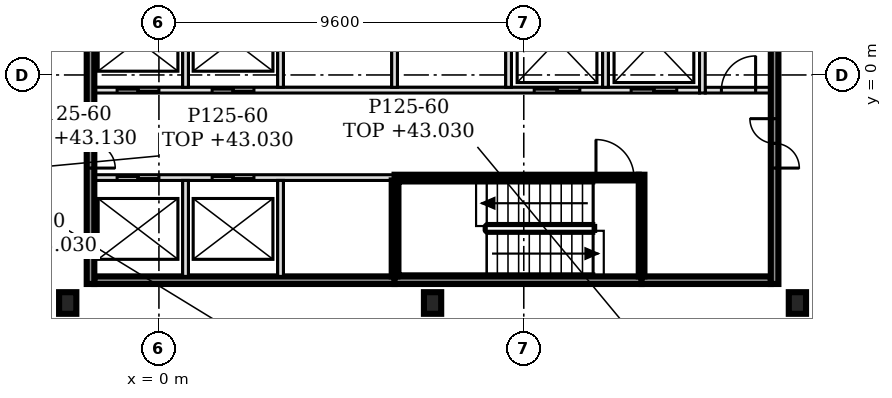
"""IFC4 building model, lengths in metres.
Left out: names, types, materials, properties, quantities, classifications, styles, units other than length and angle.
Written with IfcOpenShell. Run it as: python <this file> out.ifc"""

import sys

from ifc_helpers import new_model, si_unit, direction, frame, frame_2d, origin, origin_2d, place, context, subcontext, project, spatial, rectangle, i_section, extrude, element, fill, save


model = new_model("IFC4")
c1 = context("Model", 3, precision=1e-05, world=origin(), true_north=direction((0.0, 1.0)))
c2 = subcontext(c1, "Body", "Model", "MODEL_VIEW")
j1 = project(units=[si_unit("LENGTHUNIT", "METRE"), si_unit("PLANEANGLEUNIT", "RADIAN")], contexts=[c1])
p1 = place(None, origin())
s1 = spatial("IfcSite", under=j1, at=p1, CompositionType="ELEMENT")
p2 = place(p1, origin())
s2 = spatial("IfcBuilding", under=s1, at=p2, CompositionType="ELEMENT")
p3 = place(p2, frame((0.0, 0.0, 40.2)))
s3 = spatial("IfcBuildingStorey", under=s2, at=p3, CompositionType="ELEMENT", Elevation=40.2)
for number, where, z_axis, x_axis in (
    (1, (-2.4, -6.0, -0.15), (0.0, 0.0, 1.0), (1.0, 0.0, 0.0)),
    (2, (7.2, -6.0, -0.15), (0.0, 0.0, 1.0), (1.0, 0.0, 0.0)),
    (3, (16.8, -6.0, -0.15), (0.0, 0.0, 1.0), (1.0, 0.0, 0.0)),
):
    element("IfcColumn", number, at=place(p3, frame(where, z_axis=z_axis, x_axis=x_axis)), inside=s3, PredefinedType="COLUMN", context=c2, shape_type="SweptSolid", body=[
        extrude(i_section(OverallWidth=0.454, OverallDepth=0.569, WebThickness=0.078, FlangeThickness=0.125, FilletRadius=0.015, at=origin_2d()), origin(), (0.0, 0.0, 1.0), 3.6),
    ])
p4 = place(p3, frame((-1.7, -5.4, 0.0), z_axis=(0.0, 0.0, 1.0), x_axis=(1.0, 0.0, 0.0)))
e4 = element("IfcWall", 4, at=p4, inside=s3, PredefinedType="SOLIDWALL", context=c2, shape_type="SweptSolid", body=[
    extrude(rectangle(XDim=7.9, YDim=0.2, at=frame_2d((3.95, 0.0))), origin(), (0.0, 0.0, 1.0), 3.45),
])
p5 = place(p3, frame((6.2, -5.4, 0.0), z_axis=(0.0, 0.0, 1.0), x_axis=(1.0, 0.0, 0.0)))
e5 = element("IfcWall", 5, at=p5, inside=s3, PredefinedType="SOLIDWALL", context=c2, shape_type="SweptSolid", body=[
    extrude(rectangle(XDim=6.5, YDim=0.2, at=frame_2d((3.25, 0.0))), origin(), (0.0, 0.0, 1.0), 3.45),
])
p6 = place(p3, frame((12.7, -5.4, 0.0), z_axis=(0.0, 0.0, 1.0), x_axis=(1.0, 0.0, 0.0)))
e6 = element("IfcWall", 6, at=p6, inside=s3, PredefinedType="SOLIDWALL", context=c2, shape_type="SweptSolid", body=[
    extrude(rectangle(XDim=3.4, YDim=0.2, at=frame_2d((1.7, 0.0))), origin(), (0.0, 0.0, 1.0), 3.45),
])
p7 = place(p3, frame((-1.7, -2.7, 0.0), z_axis=(0.0, 0.0, 1.0), x_axis=(1.0, 0.0, 0.0)))
e7 = element("IfcWall", 7, at=p7, inside=s3, PredefinedType="SOLIDWALL", context=c2, shape_type="SweptSolid", body=[
    extrude(rectangle(XDim=7.9, YDim=0.15, at=frame_2d((3.95, 0.0))), origin(), (0.0, 0.0, 1.0), 3.45),
])
p8 = place(p7, frame((0.6, 0.0, 0.0)))
e8 = element("IfcOpeningElement", 8, at=p8, cuts=e7, PredefinedType="OPENING", context=c2, shape_type="SweptSolid", body=[
    extrude(rectangle(XDim=1.1, YDim=2.1, at=frame_2d((0.55, 1.05))), frame((0.0, 0.085, 0.0), z_axis=(0.0, -1.0, 0.0), x_axis=(1.0, 0.0, 0.0)), (0.0, 0.0, 1.0), 0.17),
])
p9 = place(p7, frame((3.1, 0.0, 0.0)))
e9 = element("IfcOpeningElement", 9, at=p9, cuts=e7, PredefinedType="OPENING", context=c2, shape_type="SweptSolid", body=[
    extrude(rectangle(XDim=1.1, YDim=2.1, at=frame_2d((0.55, 1.05))), frame((0.0, 0.085, 0.0), z_axis=(0.0, -1.0, 0.0), x_axis=(1.0, 0.0, 0.0)), (0.0, 0.0, 1.0), 0.17),
])
p10 = place(p3, frame((6.2, -2.7, 0.0), z_axis=(0.0, 0.0, 1.0), x_axis=(1.0, 0.0, 0.0)))
e10 = element("IfcWall", 10, at=p10, inside=s3, PredefinedType="SOLIDWALL", context=c2, shape_type="SweptSolid", body=[
    extrude(rectangle(XDim=6.425, YDim=0.15, at=frame_2d((3.212, 0.0))), origin(), (0.0, 0.0, 1.0), 3.45),
])
p11 = place(p10, frame((5.3, 0.0, 0.0)))
e11 = element("IfcOpeningElement", 11, at=p11, cuts=e10, PredefinedType="OPENING", context=c2, shape_type="SweptSolid", body=[
    extrude(rectangle(XDim=1.0, YDim=2.1, at=frame_2d((0.5, 1.05))), frame((0.0, 0.085, 0.0), z_axis=(0.0, -1.0, 0.0), x_axis=(1.0, 0.0, 0.0)), (0.0, 0.0, 1.0), 0.17),
])
p12 = place(p3, frame((-1.7, -0.4, 0.0), z_axis=(0.0, 0.0, 1.0), x_axis=(1.0, 0.0, 0.0)))
e12 = element("IfcWall", 12, at=p12, inside=s3, PredefinedType="SOLIDWALL", context=c2, shape_type="SweptSolid", body=[
    extrude(rectangle(XDim=15.925, YDim=0.15, at=frame_2d((7.962, 0.0))), origin(), (0.0, 0.0, 1.0), 3.45),
])
p13 = place(p12, frame((0.6, 0.0, 0.0)))
e13 = element("IfcOpeningElement", 13, at=p13, cuts=e12, PredefinedType="OPENING", context=c2, shape_type="SweptSolid", body=[
    extrude(rectangle(XDim=1.1, YDim=2.1, at=frame_2d((0.55, 1.05))), frame((0.0, 0.085, 0.0), z_axis=(0.0, -1.0, 0.0), x_axis=(1.0, 0.0, 0.0)), (0.0, 0.0, 1.0), 0.17),
])
p14 = place(p12, frame((3.1, 0.0, 0.0)))
e14 = element("IfcOpeningElement", 14, at=p14, cuts=e12, PredefinedType="OPENING", context=c2, shape_type="SweptSolid", body=[
    extrude(rectangle(XDim=1.1, YDim=2.1, at=frame_2d((0.55, 1.05))), frame((0.0, 0.085, 0.0), z_axis=(0.0, -1.0, 0.0), x_axis=(1.0, 0.0, 0.0)), (0.0, 0.0, 1.0), 0.17),
])
p15 = place(p12, frame((11.575, 0.0, 0.0)))
e15 = element("IfcOpeningElement", 15, at=p15, cuts=e12, PredefinedType="OPENING", context=c2, shape_type="SweptSolid", body=[
    extrude(rectangle(XDim=1.2, YDim=2.1, at=frame_2d((0.6, 1.05))), frame((0.0, 0.085, 0.0), z_axis=(0.0, -1.0, 0.0), x_axis=(1.0, 0.0, 0.0)), (0.0, 0.0, 1.0), 0.17),
])
p16 = place(p12, frame((14.125, 0.0, 0.0)))
e16 = element("IfcOpeningElement", 16, at=p16, cuts=e12, PredefinedType="OPENING", context=c2, shape_type="SweptSolid", body=[
    extrude(rectangle(XDim=1.2, YDim=2.1, at=frame_2d((0.6, 1.05))), frame((0.0, 0.085, 0.0), z_axis=(0.0, -1.0, 0.0), x_axis=(1.0, 0.0, 0.0)), (0.0, 0.0, 1.0), 0.17),
])
p17 = place(p3, frame((14.375, -0.4, 0.0), z_axis=(0.0, 0.0, 1.0), x_axis=(1.0, 0.0, 0.0)))
e17 = element("IfcWall", 17, at=p17, inside=s3, PredefinedType="PARTITIONING", context=c2, shape_type="SweptSolid", body=[
    extrude(rectangle(XDim=1.725, YDim=0.15, at=frame_2d((0.863, 0.0))), origin(), (0.0, 0.0, 1.0), 3.45),
])
p18 = place(p17, frame((0.425, 0.0, 0.0)))
e18 = element("IfcOpeningElement", 18, at=p18, cuts=e17, PredefinedType="OPENING", context=c2, shape_type="SweptSolid", body=[
    extrude(rectangle(XDim=0.9, YDim=2.1, at=frame_2d((0.45, 1.05))), frame((0.0, 0.085, 0.0), z_axis=(0.0, -1.0, 0.0), x_axis=(1.0, 0.0, 0.0)), (0.0, 0.0, 1.0), 0.17),
])
p19 = place(p3, frame((-1.8, -5.5, 0.0), z_axis=(0.0, 0.0, 1.0), x_axis=(0.0, 1.0, 0.0)))
e19 = element("IfcWall", 19, at=p19, inside=s3, PredefinedType="SOLIDWALL", context=c2, shape_type="SweptSolid", body=[
    extrude(rectangle(XDim=15.8, YDim=0.2, at=frame_2d((7.9, 0.0))), origin(), (0.0, 0.0, 1.0), 3.45),
])
p20 = place(p19, frame((3.05, 0.0, 0.0)))
e20 = element("IfcOpeningElement", 20, at=p20, cuts=e19, PredefinedType="OPENING", context=c2, shape_type="SweptSolid", body=[
    extrude(rectangle(XDim=1.3, YDim=2.1, at=frame_2d((0.65, 1.05))), frame((0.0, 0.11, 0.0), z_axis=(0.0, -1.0, 0.0), x_axis=(1.0, 0.0, 0.0)), (0.0, 0.0, 1.0), 0.22),
])
p21 = place(p19, frame((11.45, 0.0, 0.0)))
e21 = element("IfcOpeningElement", 21, at=p21, cuts=e19, PredefinedType="OPENING", context=c2, shape_type="SweptSolid", body=[
    extrude(rectangle(XDim=1.3, YDim=2.1, at=frame_2d((0.65, 1.05))), frame((0.0, 0.11, 0.0), z_axis=(0.0, -1.0, 0.0), x_axis=(1.0, 0.0, 0.0)), (0.0, 0.0, 1.0), 0.22),
])
p22 = place(p3, frame((0.7, -5.3, 0.0), z_axis=(0.0, 0.0, 1.0), x_axis=(0.0, 1.0, 0.0)))
e22 = element("IfcWall", 22, at=p22, inside=s3, PredefinedType="SOLIDWALL", context=c2, shape_type="SweptSolid", body=[
    extrude(rectangle(XDim=2.525, YDim=0.15, at=frame_2d((1.263, 0.0))), origin(), (0.0, 0.0, 1.0), 3.45),
])
p23 = place(p3, frame((0.7, -0.325, 0.0), z_axis=(0.0, 0.0, 1.0), x_axis=(0.0, 1.0, 0.0)))
e23 = element("IfcWall", 23, at=p23, inside=s3, PredefinedType="SOLIDWALL", context=c2, shape_type="SweptSolid", body=[
    extrude(rectangle(XDim=2.45, YDim=0.15, at=frame_2d((1.225, 0.0))), origin(), (0.0, 0.0, 1.0), 3.45),
])
p24 = place(p3, frame((3.2, -5.3, 0.0), z_axis=(0.0, 0.0, 1.0), x_axis=(0.0, 1.0, 0.0)))
e24 = element("IfcWall", 24, at=p24, inside=s3, PredefinedType="SOLIDWALL", context=c2, shape_type="SweptSolid", body=[
    extrude(rectangle(XDim=2.525, YDim=0.15, at=frame_2d((1.263, 0.0))), origin(), (0.0, 0.0, 1.0), 3.45),
])
p25 = place(p3, frame((3.2, -0.325, 0.0), z_axis=(0.0, 0.0, 1.0), x_axis=(0.0, 1.0, 0.0)))
e25 = element("IfcWall", 25, at=p25, inside=s3, PredefinedType="SOLIDWALL", context=c2, shape_type="SweptSolid", body=[
    extrude(rectangle(XDim=2.45, YDim=0.15, at=frame_2d((1.225, 0.0))), origin(), (0.0, 0.0, 1.0), 3.45),
])
p26 = place(p3, frame((6.2, -5.3, 0.0), z_axis=(0.0, 0.0, 1.0), x_axis=(0.0, 1.0, 0.0)))
e26 = element("IfcWall", 26, at=p26, inside=s3, PredefinedType="SOLIDWALL", context=c2, shape_type="SweptSolid", body=[
    extrude(rectangle(XDim=2.525, YDim=0.15, at=frame_2d((1.263, 0.0))), origin(), (0.0, 0.0, 1.0), 3.45),
])
for number, where, z_axis, x_axis in (
    (27, (6.2, -0.325, 0.0), (0.0, 0.0, 1.0), (0.0, 1.0, 0.0)),
    (28, (9.2, -0.325, 0.0), (0.0, 0.0, 1.0), (0.0, 1.0, 0.0)),
    (29, (11.75, -0.325, 0.0), (0.0, 0.0, 1.0), (0.0, 1.0, 0.0)),
):
    element("IfcWall", number, at=place(p3, frame(where, z_axis=z_axis, x_axis=x_axis)), inside=s3, PredefinedType="SOLIDWALL", context=c2, shape_type="SweptSolid", body=[
        extrude(rectangle(XDim=2.45, YDim=0.15, at=frame_2d((1.225, 0.0))), origin(), (0.0, 0.0, 1.0), 3.45),
    ])
p27 = place(p3, frame((12.7, -5.3, 0.0), z_axis=(0.0, 0.0, 1.0), x_axis=(0.0, 1.0, 0.0)))
e30 = element("IfcWall", 30, at=p27, inside=s3, PredefinedType="SOLIDWALL", context=c2, shape_type="SweptSolid", body=[
    extrude(rectangle(XDim=2.675, YDim=0.15, at=frame_2d((1.337, 0.0))), origin(), (0.0, 0.0, 1.0), 3.45),
])
p28 = place(p3, frame((14.3, -0.475, 0.0), z_axis=(0.0, 0.0, 1.0), x_axis=(0.0, 1.0, 0.0)))
e31 = element("IfcWall", 31, at=p28, inside=s3, PredefinedType="SOLIDWALL", context=c2, shape_type="SweptSolid", body=[
    extrude(rectangle(XDim=2.75, YDim=0.15, at=frame_2d((1.375, 0.0))), origin(), (0.0, 0.0, 1.0), 3.45),
])
p29 = place(p3, frame((16.2, -5.5, 0.0), z_axis=(0.0, 0.0, 1.0), x_axis=(0.0, 1.0, 0.0)))
e32 = element("IfcWall", 32, at=p29, inside=s3, PredefinedType="SOLIDWALL", context=c2, shape_type="SweptSolid", body=[
    extrude(rectangle(XDim=15.8, YDim=0.2, at=frame_2d((7.9, 0.0))), origin(), (0.0, 0.0, 1.0), 3.45),
])
p30 = place(p29, frame((3.05, 0.0, 0.0)))
e33 = element("IfcOpeningElement", 33, at=p30, cuts=e32, PredefinedType="OPENING", context=c2, shape_type="SweptSolid", body=[
    extrude(rectangle(XDim=1.3, YDim=2.1, at=frame_2d((0.65, 1.05))), frame((0.0, 0.11, 0.0), z_axis=(0.0, -1.0, 0.0), x_axis=(1.0, 0.0, 0.0)), (0.0, 0.0, 1.0), 0.22),
])
p31 = place(p29, frame((11.45, 0.0, 0.0)))
e34 = element("IfcOpeningElement", 34, at=p31, cuts=e32, PredefinedType="OPENING", context=c2, shape_type="SweptSolid", body=[
    extrude(rectangle(XDim=1.3, YDim=2.1, at=frame_2d((0.65, 1.05))), frame((0.0, 0.11, 0.0), z_axis=(0.0, -1.0, 0.0), x_axis=(1.0, 0.0, 0.0)), (0.0, 0.0, 1.0), 0.22),
])
p32 = place(p8, origin())
e35 = element("IfcDoor", 35, at=p32, inside=s3, OperationType="DOUBLE_DOOR_SLIDING", PredefinedType="DOOR", context=c2, shape_type="SweptSolid", body=[
    extrude(rectangle(XDim=1.1, YDim=2.1, at=frame_2d((0.55, 1.05))), frame((0.0, 0.025, 0.0), z_axis=(0.0, -1.0, 0.0), x_axis=(1.0, 0.0, 0.0)), (0.0, 0.0, 1.0), 0.05),
])
fill(e8, e35)
p33 = place(p9, origin())
e36 = element("IfcDoor", 36, at=p33, inside=s3, OperationType="DOUBLE_DOOR_SLIDING", PredefinedType="DOOR", context=c2, shape_type="SweptSolid", body=[
    extrude(rectangle(XDim=1.1, YDim=2.1, at=frame_2d((0.55, 1.05))), frame((0.0, 0.025, 0.0), z_axis=(0.0, -1.0, 0.0), x_axis=(1.0, 0.0, 0.0)), (0.0, 0.0, 1.0), 0.05),
])
fill(e9, e36)
p34 = place(p13, origin())
e37 = element("IfcDoor", 37, at=p34, inside=s3, OperationType="DOUBLE_DOOR_SLIDING", PredefinedType="DOOR", context=c2, shape_type="SweptSolid", body=[
    extrude(rectangle(XDim=1.1, YDim=2.1, at=frame_2d((0.55, 1.05))), frame((0.0, 0.025, 0.0), z_axis=(0.0, -1.0, 0.0), x_axis=(1.0, 0.0, 0.0)), (0.0, 0.0, 1.0), 0.05),
])
fill(e13, e37)
p35 = place(p14, origin())
e38 = element("IfcDoor", 38, at=p35, inside=s3, OperationType="DOUBLE_DOOR_SLIDING", PredefinedType="DOOR", context=c2, shape_type="SweptSolid", body=[
    extrude(rectangle(XDim=1.1, YDim=2.1, at=frame_2d((0.55, 1.05))), frame((0.0, 0.025, 0.0), z_axis=(0.0, -1.0, 0.0), x_axis=(1.0, 0.0, 0.0)), (0.0, 0.0, 1.0), 0.05),
])
fill(e14, e38)
p36 = place(p15, origin())
e39 = element("IfcDoor", 39, at=p36, inside=s3, OperationType="DOUBLE_DOOR_SLIDING", PredefinedType="DOOR", context=c2, shape_type="SweptSolid", body=[
    extrude(rectangle(XDim=1.2, YDim=2.1, at=frame_2d((0.6, 1.05))), frame((0.0, 0.025, 0.0), z_axis=(0.0, -1.0, 0.0), x_axis=(1.0, 0.0, 0.0)), (0.0, 0.0, 1.0), 0.05),
])
fill(e15, e39)
p37 = place(p16, origin())
e40 = element("IfcDoor", 40, at=p37, inside=s3, OperationType="DOUBLE_DOOR_SLIDING", PredefinedType="DOOR", context=c2, shape_type="SweptSolid", body=[
    extrude(rectangle(XDim=1.2, YDim=2.1, at=frame_2d((0.6, 1.05))), frame((0.0, 0.025, 0.0), z_axis=(0.0, -1.0, 0.0), x_axis=(1.0, 0.0, 0.0)), (0.0, 0.0, 1.0), 0.05),
])
fill(e16, e40)
p38 = place(p11, origin())
e41 = element("IfcDoor", 41, at=p38, inside=s3, OperationType="SINGLE_SWING_LEFT", PredefinedType="DOOR", context=c2, shape_type="SweptSolid", body=[
    extrude(rectangle(XDim=1.0, YDim=2.1, at=frame_2d((0.5, 1.05))), frame((0.0, 0.025, 0.0), z_axis=(0.0, -1.0, 0.0), x_axis=(1.0, 0.0, 0.0)), (0.0, 0.0, 1.0), 0.05),
])
fill(e11, e41)
p39 = place(p20, origin())
e42 = element("IfcDoor", 42, at=p39, inside=s3, OperationType="DOUBLE_DOOR_SINGLE_SWING", PredefinedType="DOOR", context=c2, shape_type="SweptSolid", body=[
    extrude(rectangle(XDim=1.3, YDim=2.1, at=frame_2d((0.65, 1.05))), frame((0.0, 0.025, 0.0), z_axis=(0.0, -1.0, 0.0), x_axis=(1.0, 0.0, 0.0)), (0.0, 0.0, 1.0), 0.05),
])
fill(e20, e42)
p40 = place(p30, origin())
e43 = element("IfcDoor", 43, at=p40, inside=s3, OperationType="DOUBLE_DOOR_SINGLE_SWING", PredefinedType="DOOR", context=c2, shape_type="SweptSolid", body=[
    extrude(rectangle(XDim=1.3, YDim=2.1, at=frame_2d((0.65, 1.05))), frame((0.0, 0.025, 0.0), z_axis=(0.0, -1.0, 0.0), x_axis=(1.0, 0.0, 0.0)), (0.0, 0.0, 1.0), 0.05),
])
fill(e33, e43)
p41 = place(p18, origin())
e44 = element("IfcDoor", 44, at=p41, inside=s3, OperationType="SINGLE_SWING_RIGHT", PredefinedType="DOOR", context=c2, shape_type="SweptSolid", body=[
    extrude(rectangle(XDim=0.9, YDim=2.1, at=frame_2d((0.45, 1.05))), frame((0.0, 0.025, 0.0), z_axis=(0.0, -1.0, 0.0), x_axis=(1.0, 0.0, 0.0)), (0.0, 0.0, 1.0), 0.05),
])
fill(e18, e44)
save(model, sys.argv[1])
